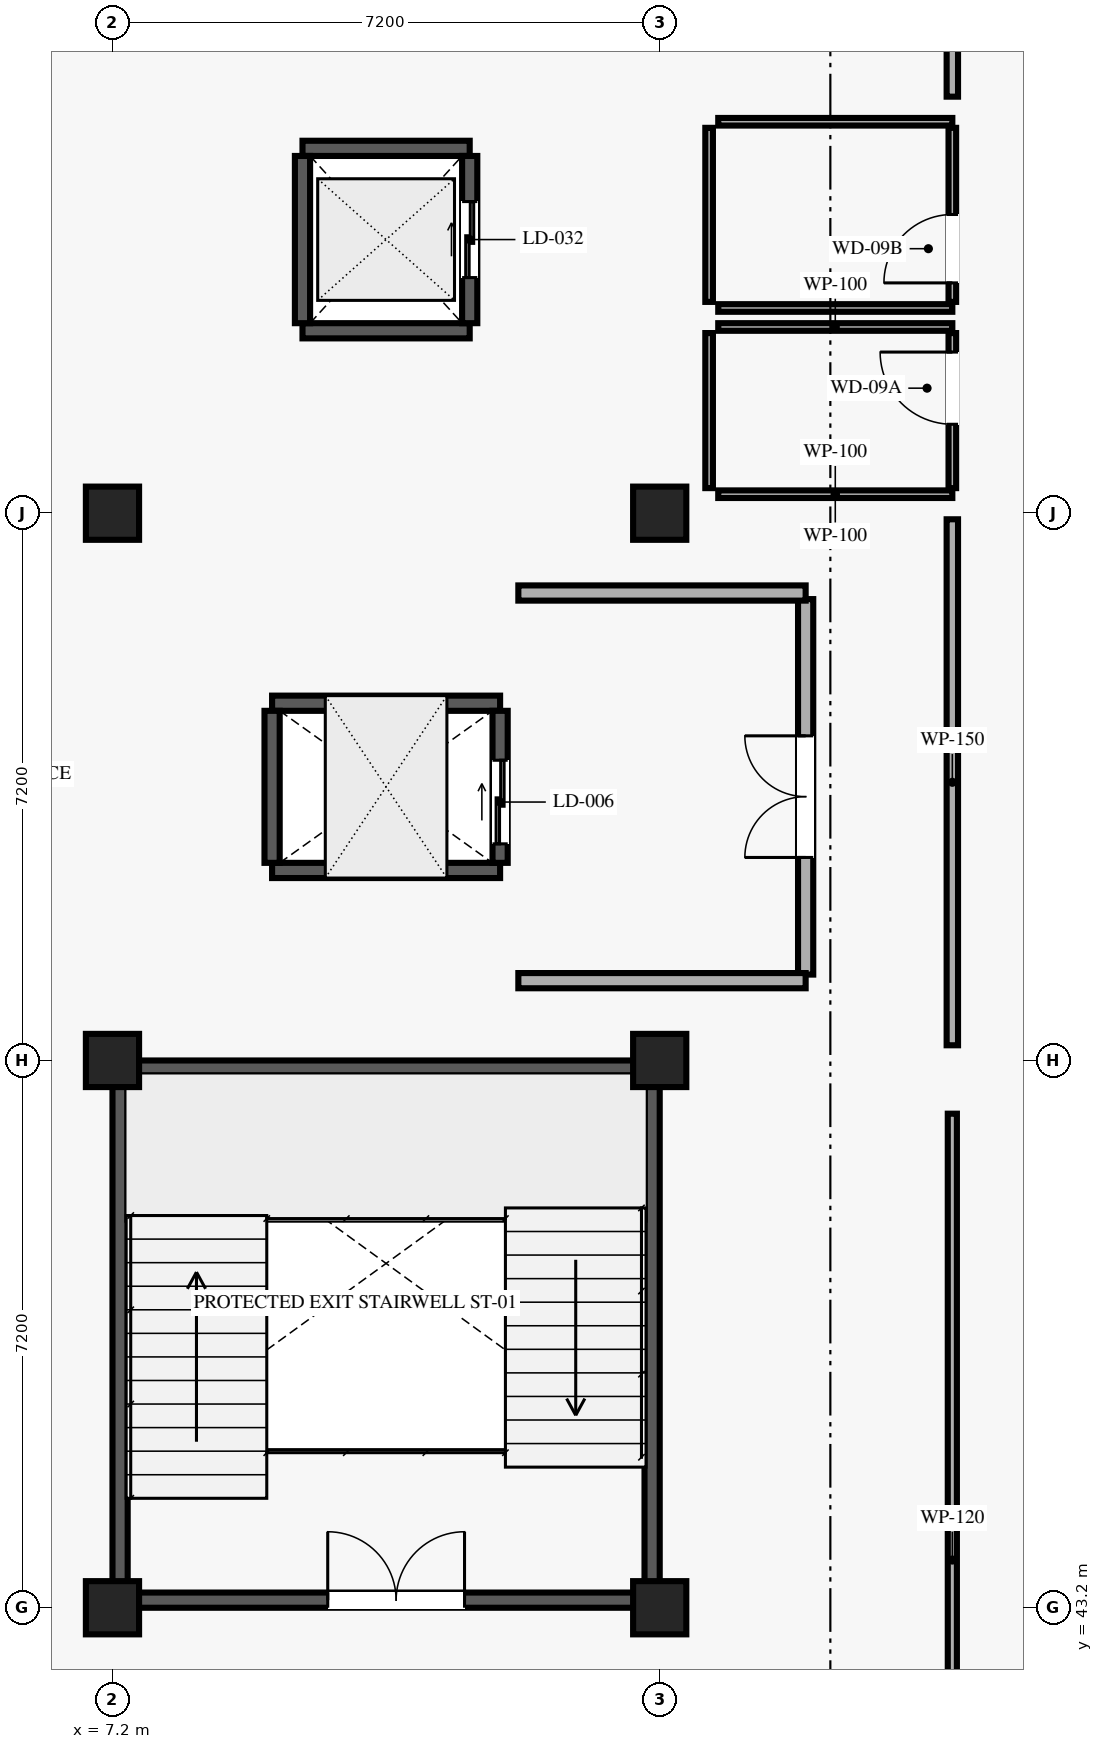
"""IFC4 building model, lengths in metres.
Left out: names, types, materials, properties, quantities, classifications, styles, units other than length and angle.
Written with IfcOpenShell. Run it as: python <this file> out.ifc"""

import sys

from ifc_helpers import new_model, si_unit, direction, frame, frame_2d, origin, origin_2d, place, context, subcontext, project, spatial, rectangle, extrude, element, fill, save


model = new_model("IFC4")
c1 = context("Model", 3, precision=1e-05, world=origin(), true_north=direction((0.0, 1.0)))
c2 = subcontext(c1, "Body", "Model", "MODEL_VIEW")
j1 = project(units=[si_unit("LENGTHUNIT", "METRE"), si_unit("PLANEANGLEUNIT", "RADIAN")], contexts=[c1])
p1 = place(None, origin())
s1 = spatial("IfcSite", under=j1, at=p1, CompositionType="ELEMENT")
p2 = place(p1, origin())
s2 = spatial("IfcBuilding", under=s1, at=p2, CompositionType="ELEMENT")
p3 = place(p2, frame((0.0, 0.0, 17.55)))
s3 = spatial("IfcBuildingStorey", under=s2, at=p3, CompositionType="ELEMENT", Elevation=17.55)
for number, where, z_axis, x_axis in (
    (1, (7.2, 43.2, 0.0), (0.0, 0.0, 1.0), (1.0, 0.0, 0.0)),
    (2, (7.2, 50.4, 0.0), (0.0, 0.0, 1.0), (1.0, 0.0, 0.0)),
    (3, (7.2, 57.6, 0.0), (0.0, 0.0, 1.0), (1.0, 0.0, 0.0)),
    (4, (14.4, 43.2, 0.0), (0.0, 0.0, 1.0), (1.0, 0.0, 0.0)),
    (5, (14.4, 50.4, 0.0), (0.0, 0.0, 1.0), (1.0, 0.0, 0.0)),
    (6, (14.4, 57.6, 0.0), (0.0, 0.0, 1.0), (1.0, 0.0, 0.0)),
):
    element("IfcColumn", number, at=place(p3, frame(where, z_axis=z_axis, x_axis=x_axis)), inside=s3, PredefinedType="COLUMN", context=c2, shape_type="SweptSolid", body=[
        extrude(rectangle(XDim=0.7, YDim=0.7, at=origin_2d()), origin(), (0.0, 0.0, 1.0), 4.05),
    ])
p4 = place(p3, frame((7.4, 43.3, 0.0), z_axis=(0.0, 0.0, 1.0), x_axis=(1.0, 0.0, 0.0)))
e7 = element("IfcWall", 7, at=p4, inside=s3, PredefinedType="SHEAR", context=c2, shape_type="SweptSolid", body=[
    extrude(rectangle(XDim=6.8, YDim=0.2, at=frame_2d((3.4, 0.0))), origin(), (0.0, 0.0, 1.0), 3.83),
])
p5 = place(p4, frame((2.632, 0.0, 0.0)))
e8 = element("IfcOpeningElement", 8, at=p5, cuts=e7, PredefinedType="OPENING", context=c2, shape_type="SweptSolid", body=[
    extrude(rectangle(XDim=1.8, YDim=2.2, at=frame_2d((0.9, 1.1))), frame((0.0, 0.11, 0.0), z_axis=(0.0, -1.0, 0.0), x_axis=(1.0, 0.0, 0.0)), (0.0, 0.0, 1.0), 0.22),
])
for number, where, z_axis, x_axis in (
    (9, (7.4, 50.3, 0.0), (0.0, 0.0, 1.0), (1.0, 0.0, 0.0)),
    (10, (7.3, 43.4, 0.0), (0.0, 0.0, 1.0), (0.0, 1.0, 0.0)),
    (11, (14.3, 43.4, 0.0), (0.0, 0.0, 1.0), (0.0, 1.0, 0.0)),
):
    element("IfcWall", number, at=place(p3, frame(where, z_axis=z_axis, x_axis=x_axis)), inside=s3, PredefinedType="SHEAR", context=c2, shape_type="SweptSolid", body=[
        extrude(rectangle(XDim=6.8, YDim=0.2, at=frame_2d((3.4, 0.0))), origin(), (0.0, 0.0, 1.0), 3.83),
    ])
for number, where, z_axis, x_axis in (
    (12, (9.3, 52.9, 0.0), (0.0, 0.0, 1.0), (1.0, 0.0, 0.0)),
    (13, (9.3, 55.1, 0.0), (0.0, 0.0, 1.0), (1.0, 0.0, 0.0)),
):
    element("IfcWall", number, at=place(p3, frame(where, z_axis=z_axis, x_axis=x_axis)), inside=s3, PredefinedType="SHEAR", context=c2, shape_type="SweptSolid", body=[
        extrude(rectangle(XDim=3.0, YDim=0.2, at=frame_2d((1.5, 0.0))), origin(), (0.0, 0.0, 1.0), 3.83),
    ])
p6 = place(p3, frame((9.3, 53.0, 0.0), z_axis=(0.0, 0.0, 1.0), x_axis=(0.0, 1.0, 0.0)))
e14 = element("IfcWall", 14, at=p6, inside=s3, PredefinedType="SHEAR", context=c2, shape_type="SweptSolid", body=[
    extrude(rectangle(XDim=2.0, YDim=0.2, at=frame_2d((1.0, 0.0))), origin(), (0.0, 0.0, 1.0), 3.83),
])
p7 = place(p3, frame((12.3, 53.0, 0.0), z_axis=(0.0, 0.0, 1.0), x_axis=(0.0, 1.0, 0.0)))
e15 = element("IfcWall", 15, at=p7, inside=s3, PredefinedType="SHEAR", context=c2, shape_type="SweptSolid", body=[
    extrude(rectangle(XDim=2.0, YDim=0.2, at=frame_2d((1.0, 0.0))), origin(), (0.0, 0.0, 1.0), 3.83),
])
p8 = place(p7, frame((0.25, 0.0, 0.0)))
e16 = element("IfcOpeningElement", 16, at=p8, cuts=e15, PredefinedType="OPENING", context=c2, shape_type="SweptSolid", body=[
    extrude(rectangle(XDim=1.1, YDim=2.15, at=frame_2d((0.55, 1.075))), frame((0.0, 0.11, 0.0), z_axis=(0.0, -1.0, 0.0), x_axis=(1.0, 0.0, 0.0)), (0.0, 0.0, 1.0), 0.22),
])
for number, where, z_axis, x_axis in (
    (17, (9.7, 60.0, 0.0), (0.0, 0.0, 1.0), (1.0, 0.0, 0.0)),
    (18, (9.7, 62.4, 0.0), (0.0, 0.0, 1.0), (1.0, 0.0, 0.0)),
    (19, (9.7, 60.1, 0.0), (0.0, 0.0, 1.0), (0.0, 1.0, 0.0)),
):
    element("IfcWall", number, at=place(p3, frame(where, z_axis=z_axis, x_axis=x_axis)), inside=s3, PredefinedType="SHEAR", context=c2, shape_type="SweptSolid", body=[
        extrude(rectangle(XDim=2.2, YDim=0.2, at=frame_2d((1.1, 0.0))), origin(), (0.0, 0.0, 1.0), 3.83),
    ])
p9 = place(p3, frame((11.9, 60.1, 0.0), z_axis=(0.0, 0.0, 1.0), x_axis=(0.0, 1.0, 0.0)))
e20 = element("IfcWall", 20, at=p9, inside=s3, PredefinedType="SHEAR", context=c2, shape_type="SweptSolid", body=[
    extrude(rectangle(XDim=2.2, YDim=0.2, at=frame_2d((1.1, 0.0))), origin(), (0.0, 0.0, 1.0), 3.83),
])
p10 = place(p9, frame((0.6, 0.0, 0.0)))
e21 = element("IfcOpeningElement", 21, at=p10, cuts=e20, PredefinedType="OPENING", context=c2, shape_type="SweptSolid", body=[
    extrude(rectangle(XDim=1.0, YDim=2.1, at=frame_2d((0.5, 1.05))), frame((0.0, 0.11, 0.0), z_axis=(0.0, -1.0, 0.0), x_axis=(1.0, 0.0, 0.0)), (0.0, 0.0, 1.0), 0.22),
])
p11 = place(p3, frame((16.32, 51.53, 0.0), z_axis=(0.0, 0.0, 1.0), x_axis=(0.0, 1.0, 0.0)))
e22 = element("IfcWall", 22, at=p11, inside=s3, PredefinedType="SOLIDWALL", context=c2, shape_type="SweptSolid", body=[
    extrude(rectangle(XDim=4.94, YDim=0.2, at=frame_2d((2.47, 0.0))), origin(), (0.0, 0.0, 1.0), 3.83),
])
p12 = place(p11, frame((1.541, 0.0, 0.0)))
e23 = element("IfcOpeningElement", 23, at=p12, cuts=e22, PredefinedType="OPENING", context=c2, shape_type="SweptSolid", body=[
    extrude(rectangle(XDim=1.6, YDim=2.2, at=frame_2d((0.8, 1.1))), frame((0.0, 0.11, 0.0), z_axis=(0.0, -1.0, 0.0), x_axis=(1.0, 0.0, 0.0)), (0.0, 0.0, 1.0), 0.22),
])
for number, where, z_axis, x_axis in (
    (24, (12.54, 51.45, 0.0), (0.0, 0.0, 1.0), (1.0, 0.0, 0.0)),
    (25, (12.54, 56.55, 0.0), (0.0, 0.0, 1.0), (1.0, 0.0, 0.0)),
):
    element("IfcWall", number, at=place(p3, frame(where, z_axis=z_axis, x_axis=x_axis)), inside=s3, PredefinedType="SOLIDWALL", context=c2, shape_type="SweptSolid", body=[
        extrude(rectangle(XDim=3.78, YDim=0.2, at=frame_2d((1.89, 0.0))), origin(), (0.0, 0.0, 1.0), 3.83),
    ])
p13 = place(p3, frame((18.25, 57.93, 0.0), z_axis=(0.0, 0.0, 1.0), x_axis=(0.0, 1.0, 0.0)))
e26 = element("IfcWall", 26, at=p13, inside=s3, PredefinedType="PARTITIONING", context=c2, shape_type="SweptSolid", body=[
    extrude(rectangle(XDim=2.04, YDim=0.1, at=frame_2d((1.02, 0.0))), origin(), (0.0, 0.0, 1.0), 3.83),
])
p14 = place(p13, frame((0.84, 0.0, 0.0)))
e27 = element("IfcOpeningElement", 27, at=p14, cuts=e26, PredefinedType="OPENING", context=c2, shape_type="SweptSolid", body=[
    extrude(rectangle(XDim=0.95, YDim=2.1, at=frame_2d((0.475, 1.05))), frame((0.0, 0.06, 0.0), z_axis=(0.0, -1.0, 0.0), x_axis=(1.0, 0.0, 0.0)), (0.0, 0.0, 1.0), 0.12),
])
p15 = place(p3, frame((15.17, 57.85, 0.0), z_axis=(0.0, 0.0, 1.0), x_axis=(1.0, 0.0, 0.0)))
e28 = element("IfcWall", 28, at=p15, inside=s3, PredefinedType="PARTITIONING", context=c2, shape_type="SweptSolid", body=[
    extrude(rectangle(XDim=3.08, YDim=0.1, at=frame_2d((1.54, 0.0))), origin(), (0.0, 0.0, 1.0), 3.27),
])
p16 = place(p3, frame((15.17, 60.05, 0.0), z_axis=(0.0, 0.0, 1.0), x_axis=(1.0, 0.0, 0.0)))
e29 = element("IfcWall", 29, at=p16, inside=s3, PredefinedType="PARTITIONING", context=c2, shape_type="SweptSolid", body=[
    extrude(rectangle(XDim=3.08, YDim=0.1, at=frame_2d((1.54, 0.0))), origin(), (0.0, 0.0, 1.0), 3.83),
])
p17 = place(p3, frame((15.05, 57.93, 0.0), z_axis=(0.0, 0.0, 1.0), x_axis=(0.0, 1.0, 0.0)))
e30 = element("IfcWall", 30, at=p17, inside=s3, PredefinedType="PARTITIONING", context=c2, shape_type="SweptSolid", body=[
    extrude(rectangle(XDim=2.04, YDim=0.1, at=frame_2d((1.02, 0.0))), origin(), (0.0, 0.0, 1.0), 3.83),
])
p18 = place(p3, frame((18.25, 60.38, 0.0), z_axis=(0.0, 0.0, 1.0), x_axis=(0.0, 1.0, 0.0)))
e31 = element("IfcWall", 31, at=p18, inside=s3, PredefinedType="PARTITIONING", context=c2, shape_type="SweptSolid", body=[
    extrude(rectangle(XDim=2.29, YDim=0.1, at=frame_2d((1.145, 0.0))), origin(), (0.0, 0.0, 1.0), 3.83),
])
p19 = place(p18, frame((0.25, 0.0, 0.0)))
e32 = element("IfcOpeningElement", 32, at=p19, cuts=e31, PredefinedType="OPENING", context=c2, shape_type="SweptSolid", body=[
    extrude(rectangle(XDim=0.9, YDim=2.1, at=frame_2d((0.45, 1.05))), frame((0.0, 0.06, 0.0), z_axis=(0.0, -1.0, 0.0), x_axis=(1.0, 0.0, 0.0)), (0.0, 0.0, 1.0), 0.12),
])
for number, where, z_axis, x_axis in (
    (33, (15.17, 60.3, 0.0), (0.0, 0.0, 1.0), (1.0, 0.0, 0.0)),
    (34, (15.17, 62.75, 0.0), (0.0, 0.0, 1.0), (1.0, 0.0, 0.0)),
):
    element("IfcWall", number, at=place(p3, frame(where, z_axis=z_axis, x_axis=x_axis)), inside=s3, PredefinedType="PARTITIONING", context=c2, shape_type="SweptSolid", body=[
        extrude(rectangle(XDim=3.08, YDim=0.1, at=frame_2d((1.54, 0.0))), origin(), (0.0, 0.0, 1.0), 3.83),
    ])
p20 = place(p3, frame((15.05, 60.38, 0.0), z_axis=(0.0, 0.0, 1.0), x_axis=(0.0, 1.0, 0.0)))
e35 = element("IfcWall", 35, at=p20, inside=s3, PredefinedType="PARTITIONING", context=c2, shape_type="SweptSolid", body=[
    extrude(rectangle(XDim=2.29, YDim=0.1, at=frame_2d((1.145, 0.0))), origin(), (0.0, 0.0, 1.0), 3.83),
])
p21 = place(p3, frame((18.25, 36.55, 0.0), z_axis=(0.0, 0.0, 1.0), x_axis=(0.0, 1.0, 0.0)))
e36 = element("IfcWall", 36, at=p21, inside=s3, PredefinedType="PARTITIONING", context=c2, shape_type="SweptSolid", body=[
    extrude(rectangle(XDim=13.15, YDim=0.12, at=frame_2d((6.575, 0.0))), origin(), (0.0, 0.0, 1.0), 3.83),
])
p22 = place(p21, frame((2.51, 0.0, 0.0)))
e37 = element("IfcOpeningElement", 37, at=p22, cuts=e36, PredefinedType="OPENING", context=c2, shape_type="SweptSolid", body=[
    extrude(rectangle(XDim=1.1, YDim=2.2, at=frame_2d((0.55, 1.1))), frame((0.0, 0.07, 0.0), z_axis=(0.0, -1.0, 0.0), x_axis=(1.0, 0.0, 0.0)), (0.0, 0.0, 1.0), 0.14),
])
p23 = place(p3, frame((18.25, 63.08, 0.0), z_axis=(0.0, 0.0, 1.0), x_axis=(0.0, 1.0, 0.0)))
e38 = element("IfcWall", 38, at=p23, inside=s3, PredefinedType="PARTITIONING", context=c2, shape_type="SweptSolid", body=[
    extrude(rectangle(XDim=8.62, YDim=0.15, at=frame_2d((4.31, 0.0))), origin(), (0.0, 0.0, 1.0), 3.83),
])
p24 = place(p23, frame((4.814, 0.0, 0.0)))
e39 = element("IfcOpeningElement", 39, at=p24, cuts=e38, PredefinedType="OPENING", context=c2, shape_type="SweptSolid", body=[
    extrude(rectangle(XDim=1.02, YDim=2.15, at=frame_2d((0.51, 1.075))), frame((0.0, 0.085, 0.0), z_axis=(0.0, -1.0, 0.0), x_axis=(1.0, 0.0, 0.0)), (0.0, 0.0, 1.0), 0.17),
])
p25 = place(p3, frame((18.25, 50.6, 0.0), z_axis=(0.0, 0.0, 1.0), x_axis=(0.0, 1.0, 0.0)))
e40 = element("IfcWall", 40, at=p25, inside=s3, PredefinedType="PARTITIONING", context=c2, shape_type="SweptSolid", body=[
    extrude(rectangle(XDim=6.92, YDim=0.15, at=frame_2d((3.46, 0.0))), origin(), (0.0, 0.0, 1.0), 3.83),
])
p26 = place(p5, origin())
e41 = element("IfcDoor", 41, at=p26, inside=s3, OperationType="DOUBLE_DOOR_SINGLE_SWING", PredefinedType="DOOR", context=c2, shape_type="SweptSolid", body=[
    extrude(rectangle(XDim=1.8, YDim=2.2, at=frame_2d((0.9, 1.1))), frame((0.0, 0.025, 0.0), z_axis=(0.0, -1.0, 0.0), x_axis=(1.0, 0.0, 0.0)), (0.0, 0.0, 1.0), 0.05),
])
fill(e8, e41)
p27 = place(p8, origin())
e42 = element("IfcDoor", 42, at=p27, inside=s3, OperationType="DOUBLE_DOOR_SLIDING", PredefinedType="DOOR", context=c2, shape_type="SweptSolid", body=[
    extrude(rectangle(XDim=1.1, YDim=2.15, at=frame_2d((0.55, 1.075))), frame((0.0, 0.025, 0.0), z_axis=(0.0, -1.0, 0.0), x_axis=(1.0, 0.0, 0.0)), (0.0, 0.0, 1.0), 0.05),
])
fill(e16, e42)
p28 = place(p10, origin())
e43 = element("IfcDoor", 43, at=p28, inside=s3, OperationType="DOUBLE_DOOR_SLIDING", PredefinedType="DOOR", context=c2, shape_type="SweptSolid", body=[
    extrude(rectangle(XDim=1.0, YDim=2.1, at=frame_2d((0.5, 1.05))), frame((0.0, 0.025, 0.0), z_axis=(0.0, -1.0, 0.0), x_axis=(1.0, 0.0, 0.0)), (0.0, 0.0, 1.0), 0.05),
])
fill(e21, e43)
p29 = place(p12, origin())
e44 = element("IfcDoor", 44, at=p29, inside=s3, OperationType="DOUBLE_DOOR_SINGLE_SWING", PredefinedType="DOOR", context=c2, shape_type="SweptSolid", body=[
    extrude(rectangle(XDim=1.6, YDim=2.2, at=frame_2d((0.8, 1.1))), frame((0.0, 0.025, 0.0), z_axis=(0.0, -1.0, 0.0), x_axis=(1.0, 0.0, 0.0)), (0.0, 0.0, 1.0), 0.05),
])
fill(e23, e44)
p30 = place(p14, origin())
e45 = element("IfcDoor", 45, at=p30, inside=s3, OperationType="SINGLE_SWING_RIGHT", PredefinedType="DOOR", context=c2, shape_type="SweptSolid", body=[
    extrude(rectangle(XDim=0.95, YDim=2.1, at=frame_2d((0.475, 1.05))), frame((0.0, 0.025, 0.0), z_axis=(0.0, -1.0, 0.0), x_axis=(1.0, 0.0, 0.0)), (0.0, 0.0, 1.0), 0.05),
])
fill(e27, e45)
p31 = place(p19, origin())
e46 = element("IfcDoor", 46, at=p31, inside=s3, OperationType="SINGLE_SWING_LEFT", PredefinedType="DOOR", context=c2, shape_type="SweptSolid", body=[
    extrude(rectangle(XDim=0.9, YDim=2.1, at=frame_2d((0.45, 1.05))), frame((0.0, 0.025, 0.0), z_axis=(0.0, -1.0, 0.0), x_axis=(1.0, 0.0, 0.0)), (0.0, 0.0, 1.0), 0.05),
])
fill(e32, e46)
save(model, sys.argv[1])
